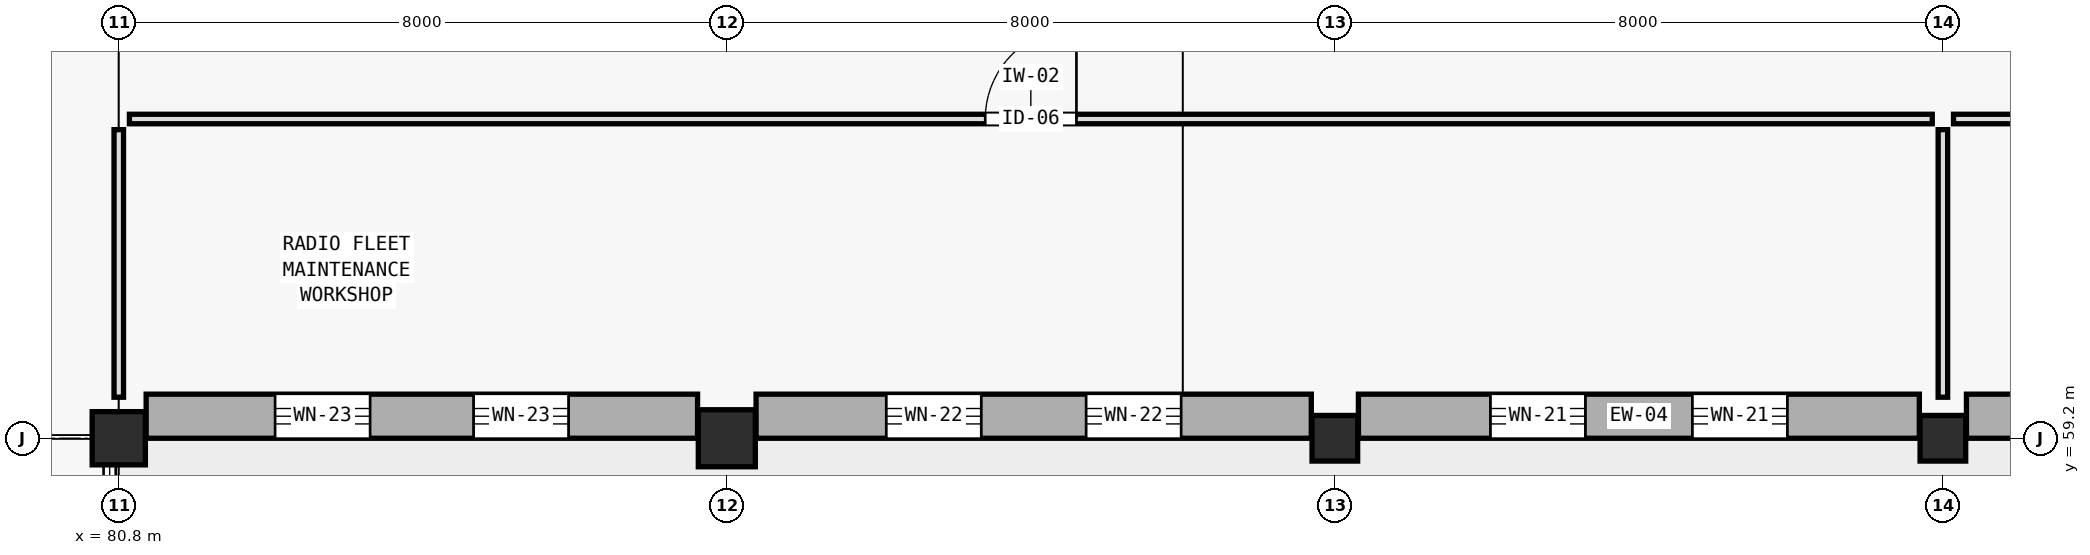
"""IFC4 building model, lengths in metres.
Left out: names, types, materials, properties, quantities, classifications, styles, units other than length and angle.
Written with IfcOpenShell. Run it as: python <this file> out.ifc"""

import sys

from ifc_helpers import new_model, si_unit, direction, frame, frame_2d, origin, origin_2d, place, context, subcontext, project, spatial, rectangle, circle, extrude, element, fill, save


model = new_model("IFC4")
c1 = context("Model", 3, precision=1e-05, world=origin(), true_north=direction((0.0, 1.0)))
c2 = subcontext(c1, "Body", "Model", "MODEL_VIEW")
j1 = project(units=[si_unit("LENGTHUNIT", "METRE"), si_unit("PLANEANGLEUNIT", "RADIAN")], contexts=[c1])
p1 = place(None, origin())
s1 = spatial("IfcSite", under=j1, at=p1, CompositionType="ELEMENT")
p2 = place(p1, origin())
s2 = spatial("IfcBuilding", under=s1, at=p2, CompositionType="ELEMENT")
p3 = place(p2, origin())
s3 = spatial("IfcBuildingStorey", under=s2, at=p3, CompositionType="ELEMENT", Elevation=0.0)
p4 = place(p3, frame((80.8, 59.2, 0.0), z_axis=(0.0, 0.0, 1.0), x_axis=(1.0, 0.0, 0.0)))
e1 = element("IfcColumn", 1, at=p4, inside=s3, PredefinedType="COLUMN", context=c2, shape_type="SweptSolid", body=[
    extrude(circle(Radius=0.35, at=origin_2d()), origin(), (0.0, 0.0, 1.0), 5.4),
])
p5 = place(p3, frame((88.8, 59.2, 0.0), z_axis=(0.0, 0.0, 1.0), x_axis=(1.0, 0.0, 0.0)))
e2 = element("IfcColumn", 2, at=p5, inside=s3, PredefinedType="COLUMN", context=c2, shape_type="SweptSolid", body=[
    extrude(rectangle(XDim=0.75, YDim=0.75, at=origin_2d()), origin(), (0.0, 0.0, 1.0), 5.4),
])
for number, where, z_axis, x_axis in (
    (3, (96.8, 59.2, 0.0), (0.0, 0.0, 1.0), (1.0, 0.0, 0.0)),
    (4, (104.8, 59.2, 0.0), (0.0, 0.0, 1.0), (1.0, 0.0, 0.0)),
):
    element("IfcColumn", number, at=place(p3, frame(where, z_axis=z_axis, x_axis=x_axis)), inside=s3, PredefinedType="COLUMN", context=c2, shape_type="SweptSolid", body=[
        extrude(rectangle(XDim=0.6, YDim=0.6, at=origin_2d()), origin(), (0.0, 0.0, 1.0), 5.4),
    ])
p6 = place(p3, frame((112.49, 59.49, 0.0), z_axis=(0.0, 0.0, 1.0), x_axis=(-1.0, 0.0, 0.0)))
e5 = element("IfcWall", 5, at=p6, inside=s3, PredefinedType="STANDARD", context=c2, shape_type="SweptSolid", body=[
    extrude(rectangle(XDim=7.38, YDim=0.58, at=frame_2d((3.69, 0.0))), origin(), (0.0, 0.0, 1.0), 5.14),
])
p7 = place(p6, frame((1.787, 0.0, 0.9)))
e6 = element("IfcOpeningElement", 6, at=p7, cuts=e5, PredefinedType="OPENING", context=c2, shape_type="SweptSolid", body=[
    extrude(rectangle(XDim=1.15, YDim=1.85, at=frame_2d((0.575, 0.925))), frame((0.0, 0.3, 0.0), z_axis=(0.0, -1.0, 0.0), x_axis=(1.0, 0.0, 0.0)), (0.0, 0.0, 1.0), 0.6),
])
p8 = place(p6, frame((4.443, 0.0, 0.9)))
e7 = element("IfcOpeningElement", 7, at=p8, cuts=e5, PredefinedType="OPENING", context=c2, shape_type="SweptSolid", body=[
    extrude(rectangle(XDim=1.15, YDim=1.85, at=frame_2d((0.575, 0.925))), frame((0.0, 0.3, 0.0), z_axis=(0.0, -1.0, 0.0), x_axis=(1.0, 0.0, 0.0)), (0.0, 0.0, 1.0), 0.6),
])
p9 = place(p3, frame((104.49, 59.49, 0.0), z_axis=(0.0, 0.0, 1.0), x_axis=(-1.0, 0.0, 0.0)))
e8 = element("IfcWall", 8, at=p9, inside=s3, PredefinedType="STANDARD", context=c2, shape_type="SweptSolid", body=[
    extrude(rectangle(XDim=7.38, YDim=0.58, at=frame_2d((3.69, 0.0))), origin(), (0.0, 0.0, 1.0), 5.14),
])
p10 = place(p9, frame((1.737, 0.0, 1.35)))
e9 = element("IfcOpeningElement", 9, at=p10, cuts=e8, PredefinedType="OPENING", context=c2, shape_type="SweptSolid", body=[
    extrude(rectangle(XDim=1.25, YDim=1.65, at=frame_2d((0.625, 0.825))), frame((0.0, 0.3, 0.0), z_axis=(0.0, -1.0, 0.0), x_axis=(1.0, 0.0, 0.0)), (0.0, 0.0, 1.0), 0.6),
])
p11 = place(p9, frame((4.393, 0.0, 1.35)))
e10 = element("IfcOpeningElement", 10, at=p11, cuts=e8, PredefinedType="OPENING", context=c2, shape_type="SweptSolid", body=[
    extrude(rectangle(XDim=1.25, YDim=1.65, at=frame_2d((0.625, 0.825))), frame((0.0, 0.3, 0.0), z_axis=(0.0, -1.0, 0.0), x_axis=(1.0, 0.0, 0.0)), (0.0, 0.0, 1.0), 0.6),
])
p12 = place(p3, frame((96.49, 59.49, 0.0), z_axis=(0.0, 0.0, 1.0), x_axis=(-1.0, 0.0, 0.0)))
e11 = element("IfcWall", 11, at=p12, inside=s3, PredefinedType="STANDARD", context=c2, shape_type="SweptSolid", body=[
    extrude(rectangle(XDim=7.305, YDim=0.58, at=frame_2d((3.652, 0.0))), origin(), (0.0, 0.0, 1.0), 5.14),
])
p13 = place(p12, frame((1.713, 0.0, 0.9)))
e12 = element("IfcOpeningElement", 12, at=p13, cuts=e11, PredefinedType="OPENING", context=c2, shape_type="SweptSolid", body=[
    extrude(rectangle(XDim=1.25, YDim=2.05, at=frame_2d((0.625, 1.025))), frame((0.0, 0.3, 0.0), z_axis=(0.0, -1.0, 0.0), x_axis=(1.0, 0.0, 0.0)), (0.0, 0.0, 1.0), 0.6),
])
p14 = place(p12, frame((4.342, 0.0, 0.9)))
e13 = element("IfcOpeningElement", 13, at=p14, cuts=e11, PredefinedType="OPENING", context=c2, shape_type="SweptSolid", body=[
    extrude(rectangle(XDim=1.25, YDim=2.05, at=frame_2d((0.625, 1.025))), frame((0.0, 0.3, 0.0), z_axis=(0.0, -1.0, 0.0), x_axis=(1.0, 0.0, 0.0)), (0.0, 0.0, 1.0), 0.6),
])
p15 = place(p3, frame((88.415, 59.49, 0.0), z_axis=(0.0, 0.0, 1.0), x_axis=(-1.0, 0.0, 0.0)))
e14 = element("IfcWall", 14, at=p15, inside=s3, PredefinedType="STANDARD", context=c2, shape_type="SweptSolid", body=[
    extrude(rectangle(XDim=7.255, YDim=0.58, at=frame_2d((3.627, 0.0))), origin(), (0.0, 0.0, 1.0), 5.14),
])
p16 = place(p15, frame((1.697, 0.0, 0.9)))
e15 = element("IfcOpeningElement", 15, at=p16, cuts=e14, PredefinedType="OPENING", context=c2, shape_type="SweptSolid", body=[
    extrude(rectangle(XDim=1.25, YDim=2.45, at=frame_2d((0.625, 1.225))), frame((0.0, 0.3, 0.0), z_axis=(0.0, -1.0, 0.0), x_axis=(1.0, 0.0, 0.0)), (0.0, 0.0, 1.0), 0.6),
])
p17 = place(p15, frame((4.308, 0.0, 0.9)))
e16 = element("IfcOpeningElement", 16, at=p17, cuts=e14, PredefinedType="OPENING", context=c2, shape_type="SweptSolid", body=[
    extrude(rectangle(XDim=1.25, YDim=2.45, at=frame_2d((0.625, 1.225))), frame((0.0, 0.3, 0.0), z_axis=(0.0, -1.0, 0.0), x_axis=(1.0, 0.0, 0.0)), (0.0, 0.0, 1.0), 0.6),
])
p18 = place(p3, frame((80.94, 63.4, 0.0), z_axis=(0.0, 0.0, 1.0), x_axis=(1.0, 0.0, 0.0)))
e17 = element("IfcWall", 17, at=p18, inside=s3, PredefinedType="PARTITIONING", context=c2, shape_type="SweptSolid", body=[
    extrude(rectangle(XDim=23.72, YDim=0.125, at=frame_2d((11.86, 0.0))), origin(), (0.0, 0.0, 1.0), 4.27),
])
p19 = place(p18, frame((11.26, 0.0, 0.0)))
e18 = element("IfcOpeningElement", 18, at=p19, cuts=e17, PredefinedType="OPENING", context=c2, shape_type="SweptSolid", body=[
    extrude(rectangle(XDim=1.2, YDim=2.2, at=frame_2d((0.6, 1.1))), frame((0.0, 0.073, 0.0), z_axis=(0.0, -1.0, 0.0), x_axis=(1.0, 0.0, 0.0)), (0.0, 0.0, 1.0), 0.145),
])
for number, where, z_axis, x_axis in (
    (19, (80.8, 59.74, 0.0), (0.0, 0.0, 1.0), (0.0, 1.0, 0.0)),
    (20, (104.8, 59.74, 0.0), (0.0, 0.0, 1.0), (0.0, 1.0, 0.0)),
):
    element("IfcWall", number, at=place(p3, frame(where, z_axis=z_axis, x_axis=x_axis)), inside=s3, PredefinedType="PARTITIONING", context=c2, shape_type="SweptSolid", body=[
        extrude(rectangle(XDim=3.52, YDim=0.125, at=frame_2d((1.76, 0.0))), origin(), (0.0, 0.0, 1.0), 4.27),
    ])
p20 = place(p3, frame((104.94, 63.4, 0.0), z_axis=(0.0, 0.0, 1.0), x_axis=(1.0, 0.0, 0.0)))
e21 = element("IfcWall", 21, at=p20, inside=s3, PredefinedType="PARTITIONING", context=c2, shape_type="SweptSolid", body=[
    extrude(rectangle(XDim=31.32, YDim=0.125, at=frame_2d((15.66, 0.0))), origin(), (0.0, 0.0, 1.0), 4.27),
])
p21 = place(p20, frame((14.91, 0.0, 0.0)))
e22 = element("IfcOpeningElement", 22, at=p21, cuts=e21, PredefinedType="OPENING", context=c2, shape_type="SweptSolid", body=[
    extrude(rectangle(XDim=1.5, YDim=2.3, at=frame_2d((0.75, 1.15))), frame((0.0, 0.073, 0.0), z_axis=(0.0, -1.0, 0.0), x_axis=(1.0, 0.0, 0.0)), (0.0, 0.0, 1.0), 0.145),
])
p22 = place(p10, origin())
e23 = element("IfcWindow", 23, at=p22, inside=s3, PartitioningType="SINGLE_PANEL", PredefinedType="WINDOW", context=c2, shape_type="SweptSolid", body=[
    extrude(rectangle(XDim=1.25, YDim=1.65, at=frame_2d((0.625, 0.825))), frame((0.0, 0.03, 0.0), z_axis=(0.0, -1.0, 0.0), x_axis=(1.0, 0.0, 0.0)), (0.0, 0.0, 1.0), 0.06),
])
fill(e9, e23)
p23 = place(p11, origin())
e24 = element("IfcWindow", 24, at=p23, inside=s3, PartitioningType="SINGLE_PANEL", PredefinedType="WINDOW", context=c2, shape_type="SweptSolid", body=[
    extrude(rectangle(XDim=1.25, YDim=1.65, at=frame_2d((0.625, 0.825))), frame((0.0, 0.03, 0.0), z_axis=(0.0, -1.0, 0.0), x_axis=(1.0, 0.0, 0.0)), (0.0, 0.0, 1.0), 0.06),
])
fill(e10, e24)
p24 = place(p13, origin())
e25 = element("IfcWindow", 25, at=p24, inside=s3, PartitioningType="SINGLE_PANEL", PredefinedType="WINDOW", context=c2, shape_type="SweptSolid", body=[
    extrude(rectangle(XDim=1.25, YDim=2.05, at=frame_2d((0.625, 1.025))), frame((0.0, 0.03, 0.0), z_axis=(0.0, -1.0, 0.0), x_axis=(1.0, 0.0, 0.0)), (0.0, 0.0, 1.0), 0.06),
])
fill(e12, e25)
p25 = place(p14, origin())
e26 = element("IfcWindow", 26, at=p25, inside=s3, PartitioningType="SINGLE_PANEL", PredefinedType="WINDOW", context=c2, shape_type="SweptSolid", body=[
    extrude(rectangle(XDim=1.25, YDim=2.05, at=frame_2d((0.625, 1.025))), frame((0.0, 0.03, 0.0), z_axis=(0.0, -1.0, 0.0), x_axis=(1.0, 0.0, 0.0)), (0.0, 0.0, 1.0), 0.06),
])
fill(e13, e26)
p26 = place(p16, origin())
e27 = element("IfcWindow", 27, at=p26, inside=s3, PartitioningType="SINGLE_PANEL", PredefinedType="WINDOW", context=c2, shape_type="SweptSolid", body=[
    extrude(rectangle(XDim=1.25, YDim=2.45, at=frame_2d((0.625, 1.225))), frame((0.0, 0.03, 0.0), z_axis=(0.0, -1.0, 0.0), x_axis=(1.0, 0.0, 0.0)), (0.0, 0.0, 1.0), 0.06),
])
fill(e15, e27)
p27 = place(p17, origin())
e28 = element("IfcWindow", 28, at=p27, inside=s3, PartitioningType="SINGLE_PANEL", PredefinedType="WINDOW", context=c2, shape_type="SweptSolid", body=[
    extrude(rectangle(XDim=1.25, YDim=2.45, at=frame_2d((0.625, 1.225))), frame((0.0, 0.03, 0.0), z_axis=(0.0, -1.0, 0.0), x_axis=(1.0, 0.0, 0.0)), (0.0, 0.0, 1.0), 0.06),
])
fill(e16, e28)
p28 = place(p19, origin())
e29 = element("IfcDoor", 29, at=p28, inside=s3, OperationType="SINGLE_SWING_RIGHT", PredefinedType="DOOR", context=c2, shape_type="SweptSolid", body=[
    extrude(rectangle(XDim=1.2, YDim=2.2, at=frame_2d((0.6, 1.1))), frame((0.0, 0.025, 0.0), z_axis=(0.0, -1.0, 0.0), x_axis=(1.0, 0.0, 0.0)), (0.0, 0.0, 1.0), 0.05),
])
fill(e18, e29)
save(model, sys.argv[1])
